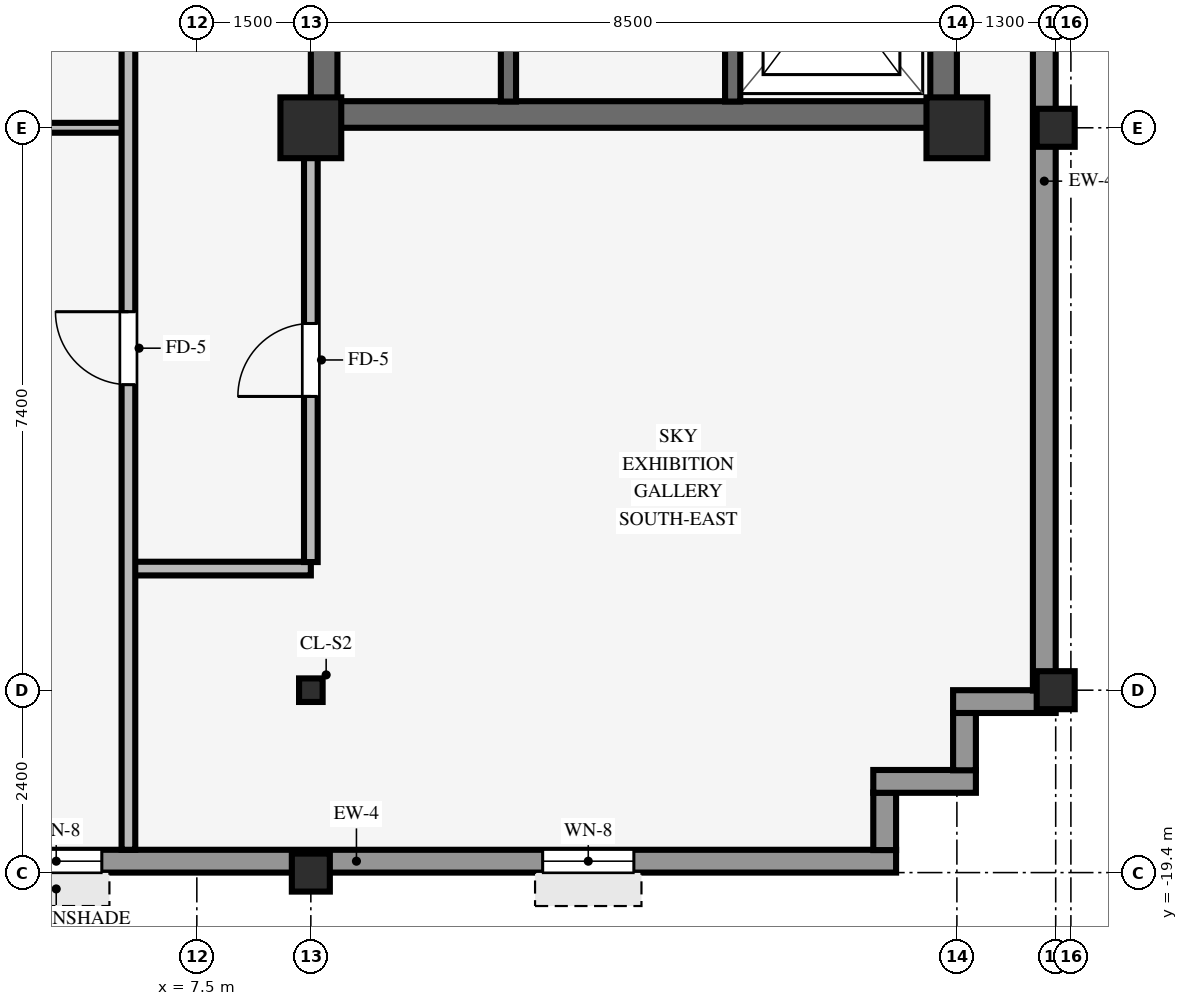
"""IFC4 building model, lengths in metres.
Left out: names, types, materials, properties, quantities, classifications, styles, units other than length and angle.
Written with IfcOpenShell. Run it as: python <this file> out.ifc"""

import sys

from ifc_helpers import new_model, si_unit, direction, frame, frame_2d, origin, origin_2d, place, context, subcontext, project, spatial, rectangle, hollow_rectangle, i_section, extrude, source, transform, mapped, element, fill, save


model = new_model("IFC4")
c1 = context("Model", 3, precision=1e-05, world=origin(), true_north=direction((0.0, 1.0)))
c2 = subcontext(c1, "Body", "Model", "MODEL_VIEW")
j1 = project(units=[si_unit("LENGTHUNIT", "METRE"), si_unit("PLANEANGLEUNIT", "RADIAN")], contexts=[c1])
p1 = place(None, origin())
s1 = spatial("IfcSite", under=j1, at=p1, CompositionType="ELEMENT")
p2 = place(p1, origin())
s2 = spatial("IfcBuilding", under=s1, at=p2, CompositionType="ELEMENT")
p3 = place(p2, frame((0.0, 0.0, 283.5)))
s3 = spatial("IfcBuildingStorey", under=s2, at=p3, CompositionType="ELEMENT", Elevation=283.5)
p4 = place(p3, frame((9.0, -9.425, 0.0), z_axis=(0.0, 0.0, 1.0), x_axis=(1.0, 0.0, 0.0)))
e1 = element("IfcWall", 1, at=p4, inside=s3, PredefinedType="SHEAR", context=c2, shape_type="SweptSolid", body=[
    extrude(rectangle(XDim=8.5, YDim=0.35, at=frame_2d((4.25, 0.0))), origin(), (0.0, 0.0, 1.0), 3.25),
])
p5 = place(p3, frame((9.175, -9.255, 0.0), z_axis=(0.0, 0.0, 1.0), x_axis=(0.0, 1.0, 0.0)))
e2 = element("IfcWall", 2, at=p5, inside=s3, PredefinedType="SHEAR", context=c2, shape_type="SweptSolid", body=[
    extrude(rectangle(XDim=18.51, YDim=0.35, at=frame_2d((9.255, 0.0))), origin(), (0.0, 0.0, 1.0), 3.25),
])
p6 = place(p5, frame((8.655, 0.0, 0.0)))
e3 = element("IfcOpeningElement", 3, at=p6, cuts=e2, PredefinedType="OPENING", context=c2, shape_type="SweptSolid", body=[
    extrude(rectangle(XDim=1.2, YDim=2.15, at=frame_2d((0.6, 1.075))), frame((0.0, 0.185, 0.0), z_axis=(0.0, -1.0, 0.0), x_axis=(1.0, 0.0, 0.0)), (0.0, 0.0, 1.0), 0.37),
])
p7 = place(p3, frame((17.325, -9.255, 0.0), z_axis=(0.0, 0.0, 1.0), x_axis=(0.0, 1.0, 0.0)))
e4 = element("IfcWall", 4, at=p7, inside=s3, PredefinedType="SHEAR", context=c2, shape_type="SweptSolid", body=[
    extrude(rectangle(XDim=18.51, YDim=0.35, at=frame_2d((9.255, 0.0))), origin(), (0.0, 0.0, 1.0), 3.25),
])
for number, where, z_axis, x_axis in (
    (5, (9.0, -9.6, 0.0), (0.0, 0.0, 1.0), (1.0, 0.0, 0.0)),
    (6, (17.5, -9.6, 0.0), (0.0, 0.0, 1.0), (1.0, 0.0, 0.0)),
):
    element("IfcColumn", number, at=place(p3, frame(where, z_axis=z_axis, x_axis=x_axis)), inside=s3, PredefinedType="COLUMN", context=c2, shape_type="SweptSolid", body=[
        extrude(rectangle(XDim=0.8, YDim=0.8, at=origin_2d()), origin(), (0.0, 0.0, 1.0), 3.25),
    ])
for number, where, z_axis, x_axis in (
    (7, (18.8, -17.0, 0.0), (0.0, 0.0, 1.0), (1.0, 0.0, 0.0)),
    (8, (18.8, -9.6, 0.0), (0.0, 0.0, 1.0), (1.0, 0.0, 0.0)),
    (9, (9.0, -19.4, 0.0), (0.0, 0.0, 1.0), (1.0, 0.0, 0.0)),
):
    element("IfcColumn", number, at=place(p3, frame(where, z_axis=z_axis, x_axis=x_axis)), inside=s3, PredefinedType="COLUMN", context=c2, shape_type="SweptSolid", body=[
        extrude(hollow_rectangle(XDim=0.5, YDim=0.5, WallThickness=0.032, InnerFilletRadius=0.032, OuterFilletRadius=0.064, at=origin_2d()), origin(), (0.0, 0.0, 1.0), 3.25),
    ])
p8 = place(p3, frame((9.0, -17.0, 0.0), z_axis=(0.0, 0.0, 1.0), x_axis=(1.0, 0.0, 0.0)))
e10 = element("IfcColumn", 10, at=p8, inside=s3, PredefinedType="COLUMN", context=c2, shape_type="SweptSolid", body=[
    extrude(i_section(OverallWidth=0.31, OverallDepth=0.31, WebThickness=0.015, FlangeThickness=0.015, FilletRadius=0.015, at=origin_2d()), origin(), (0.0, 0.0, 1.0), 3.25),
])
p9 = place(p3, frame((2.5, -19.25, 0.0), z_axis=(0.0, 0.0, 1.0), x_axis=(1.0, 0.0, 0.0)))
e11 = element("IfcWall", 11, at=p9, inside=s3, PredefinedType="STANDARD", context=c2, shape_type="SweptSolid", body=[
    extrude(rectangle(XDim=14.2, YDim=0.3, at=frame_2d((7.1, 0.0))), origin(), (0.0, 0.0, 1.0), 3.24),
])
p10 = place(p9, frame((2.55, 0.0, 0.8)))
e12 = element("IfcOpeningElement", 12, at=p10, cuts=e11, PredefinedType="OPENING", context=c2, shape_type="SweptSolid", body=[
    extrude(rectangle(XDim=1.2, YDim=1.48, at=frame_2d((0.6, 0.74))), frame((0.0, 0.16, 0.0), z_axis=(0.0, -1.0, 0.0), x_axis=(1.0, 0.0, 0.0)), (0.0, 0.0, 1.0), 0.32),
])
p11 = place(p9, frame((9.55, 0.0, 0.8)))
e13 = element("IfcOpeningElement", 13, at=p11, cuts=e11, PredefinedType="OPENING", context=c2, shape_type="SweptSolid", body=[
    extrude(rectangle(XDim=1.2, YDim=1.48, at=frame_2d((0.6, 0.74))), frame((0.0, 0.16, 0.0), z_axis=(0.0, -1.0, 0.0), x_axis=(1.0, 0.0, 0.0)), (0.0, 0.0, 1.0), 0.32),
])
p12 = place(p3, frame((16.55, -19.104, 0.0), z_axis=(0.0, 0.0, 1.0), x_axis=(0.0, 1.0, 0.0)))
e14 = element("IfcWall", 14, at=p12, inside=s3, PredefinedType="STANDARD", context=c2, shape_type="SweptSolid", body=[
    extrude(rectangle(XDim=0.758, YDim=0.3, at=frame_2d((0.379, 0.0))), origin(), (0.0, 0.0, 1.0), 3.24),
])
p13 = place(p3, frame((16.4, -18.2, 0.0), z_axis=(0.0, 0.0, 1.0), x_axis=(1.0, 0.0, 0.0)))
e15 = element("IfcWall", 15, at=p13, inside=s3, PredefinedType="STANDARD", context=c2, shape_type="SweptSolid", body=[
    extrude(rectangle(XDim=1.35, YDim=0.3, at=frame_2d((0.675, 0.0))), origin(), (0.0, 0.0, 1.0), 3.24),
])
p14 = place(p3, frame((17.6, -18.054, 0.0), z_axis=(0.0, 0.0, 1.0), x_axis=(0.0, 1.0, 0.0)))
e16 = element("IfcWall", 16, at=p14, inside=s3, PredefinedType="STANDARD", context=c2, shape_type="SweptSolid", body=[
    extrude(rectangle(XDim=0.758, YDim=0.3, at=frame_2d((0.379, 0.0))), origin(), (0.0, 0.0, 1.0), 3.24),
])
p15 = place(p3, frame((17.45, -17.15, 0.0), z_axis=(0.0, 0.0, 1.0), x_axis=(1.0, 0.0, 0.0)))
e17 = element("IfcWall", 17, at=p15, inside=s3, PredefinedType="STANDARD", context=c2, shape_type="SweptSolid", body=[
    extrude(rectangle(XDim=1.35, YDim=0.3, at=frame_2d((0.675, 0.0))), origin(), (0.0, 0.0, 1.0), 3.24),
])
p16 = place(p3, frame((18.65, -17.004, 0.0), z_axis=(0.0, 0.0, 1.0), x_axis=(0.0, 1.0, 0.0)))
e18 = element("IfcWall", 18, at=p16, inside=s3, PredefinedType="STANDARD", context=c2, shape_type="SweptSolid", body=[
    extrude(rectangle(XDim=13.404, YDim=0.3, at=frame_2d((6.702, 0.0))), origin(), (0.0, 0.0, 1.0), 2.585),
])
p17 = place(p3, frame((14.55, -9.255, 0.0), z_axis=(0.0, 0.0, 1.0), x_axis=(0.0, 1.0, 0.0)))
e19 = element("IfcWall", 19, at=p17, inside=s3, PredefinedType="SHEAR", context=c2, shape_type="SweptSolid", body=[
    extrude(rectangle(XDim=10.16, YDim=0.2, at=frame_2d((5.08, 0.0))), origin(), (0.0, 0.0, 1.0), 3.25),
])
p18 = place(p17, frame((6.615, 0.0, 0.0)))
e20 = element("IfcOpeningElement", 20, at=p18, cuts=e19, PredefinedType="OPENING", context=c2, shape_type="SweptSolid", body=[
    extrude(rectangle(XDim=0.88, YDim=2.1, at=frame_2d((0.44, 1.05))), frame((0.0, 0.11, 0.0), z_axis=(0.0, -1.0, 0.0), x_axis=(1.0, 0.0, 0.0)), (0.0, 0.0, 1.0), 0.22),
])
p19 = place(p17, frame((0.98, 0.0, 0.0)))
e21 = element("IfcOpeningElement", 21, at=p19, cuts=e19, PredefinedType="OPENING", context=c2, shape_type="SweptSolid", body=[
    extrude(rectangle(XDim=1.15, YDim=2.15, at=frame_2d((0.575, 1.075))), frame((0.0, 0.11, 0.0), z_axis=(0.0, -1.0, 0.0), x_axis=(1.0, 0.0, 0.0)), (0.0, 0.0, 1.0), 0.22),
])
p20 = place(p3, frame((11.6, -9.255, 0.0), z_axis=(0.0, 0.0, 1.0), x_axis=(0.0, 1.0, 0.0)))
e22 = element("IfcWall", 22, at=p20, inside=s3, PredefinedType="SHEAR", context=c2, shape_type="SweptSolid", body=[
    extrude(rectangle(XDim=8.025, YDim=0.2, at=frame_2d((4.012, 0.0))), origin(), (0.0, 0.0, 1.0), 3.25),
])
p21 = place(p20, frame((5.615, 0.0, 0.0)))
e23 = element("IfcOpeningElement", 23, at=p21, cuts=e22, PredefinedType="OPENING", context=c2, shape_type="SweptSolid", body=[
    extrude(rectangle(XDim=0.88, YDim=2.1, at=frame_2d((0.44, 1.05))), frame((0.0, 0.11, 0.0), z_axis=(0.0, -1.0, 0.0), x_axis=(1.0, 0.0, 0.0)), (0.0, 0.0, 1.0), 0.22),
])
p22 = place(p3, frame((6.661, -15.4, 0.0), z_axis=(0.0, 0.0, 1.0), x_axis=(1.0, 0.0, 0.0)))
e24 = element("IfcWall", 24, at=p22, inside=s3, PredefinedType="PARTITIONING", context=c2, shape_type="SweptSolid", body=[
    extrude(rectangle(XDim=2.339, YDim=0.18, at=frame_2d((1.169, 0.0))), origin(), (0.0, 0.0, 1.0), 3.24),
])
p23 = place(p3, frame((0.151, -9.6, 0.0), z_axis=(0.0, 0.0, 1.0), x_axis=(1.0, 0.0, 0.0)))
e25 = element("IfcWall", 25, at=p23, inside=s3, PredefinedType="PARTITIONING", context=c2, shape_type="SweptSolid", body=[
    extrude(rectangle(XDim=6.388, YDim=0.13, at=frame_2d((3.194, 0.0))), origin(), (0.0, 0.0, 1.0), 2.285),
])
p24 = place(p3, frame((6.6, -19.1, 0.0), z_axis=(0.0, 0.0, 1.0), x_axis=(0.0, 1.0, 0.0)))
e26 = element("IfcWall", 26, at=p24, inside=s3, PredefinedType="PARTITIONING", context=c2, shape_type="SweptSolid", body=[
    extrude(rectangle(XDim=17.764, YDim=0.18, at=frame_2d((8.882, 0.0))), origin(), (0.0, 0.0, 1.0), 3.24),
])
p25 = place(p24, frame((6.12, 0.0, 0.0)))
e27 = element("IfcOpeningElement", 27, at=p25, cuts=e26, PredefinedType="OPENING", context=c2, shape_type="SweptSolid", body=[
    extrude(rectangle(XDim=0.96, YDim=2.1, at=frame_2d((0.48, 1.05))), frame((0.0, 0.1, 0.0), z_axis=(0.0, -1.0, 0.0), x_axis=(1.0, 0.0, 0.0)), (0.0, 0.0, 1.0), 0.2),
])
p26 = place(p3, frame((9.0, -15.314, 0.0), z_axis=(0.0, 0.0, 1.0), x_axis=(0.0, 1.0, 0.0)))
e28 = element("IfcWall", 28, at=p26, inside=s3, PredefinedType="PARTITIONING", context=c2, shape_type="SweptSolid", body=[
    extrude(rectangle(XDim=5.318, YDim=0.18, at=frame_2d((2.659, 0.0))), origin(), (0.0, 0.0, 1.0), 2.772),
])
p27 = place(p26, frame((2.179, 0.0, 0.0)))
e29 = element("IfcOpeningElement", 29, at=p27, cuts=e28, PredefinedType="OPENING", context=c2, shape_type="SweptSolid", body=[
    extrude(rectangle(XDim=0.96, YDim=2.1, at=frame_2d((0.48, 1.05))), frame((0.0, 0.1, 0.0), z_axis=(0.0, -1.0, 0.0), x_axis=(1.0, 0.0, 0.0)), (0.0, 0.0, 1.0), 0.2),
])
m1 = source(origin(), c2, "Body", "SweptSolid", [
    extrude(rectangle(XDim=1.2, YDim=1.48, at=frame_2d((0.6, 0.74))), frame((0.0, 0.03, 0.0), z_axis=(0.0, -1.0, 0.0), x_axis=(1.0, 0.0, 0.0)), (0.0, 0.0, 1.0), 0.06),
])
p28 = place(p10, origin())
e30 = element("IfcWindow", 30, at=p28, inside=s3, PartitioningType="SINGLE_PANEL", PredefinedType="WINDOW", context=c2, shape_type="MappedRepresentation", body=[
    mapped(m1, transform((0.0, 0.0, 0.0), scale=1.0)),
])
fill(e12, e30)
p29 = place(p11, origin())
e31 = element("IfcWindow", 31, at=p29, inside=s3, PartitioningType="SINGLE_PANEL", PredefinedType="WINDOW", context=c2, shape_type="MappedRepresentation", body=[
    mapped(m1, transform((0.0, 0.0, 0.0), scale=1.0)),
])
fill(e13, e31)
m2 = source(origin(), c2, "Body", "SweptSolid", [
    extrude(rectangle(XDim=0.96, YDim=2.1, at=frame_2d((0.48, 1.05))), frame((0.0, 0.025, 0.0), z_axis=(0.0, -1.0, 0.0), x_axis=(1.0, 0.0, 0.0)), (0.0, 0.0, 1.0), 0.05),
])
p30 = place(p25, origin())
e32 = element("IfcDoor", 32, at=p30, inside=s3, OperationType="SINGLE_SWING_RIGHT", PredefinedType="DOOR", context=c2, shape_type="MappedRepresentation", body=[
    mapped(m2, transform((0.0, 0.0, 0.0), scale=1.0)),
])
fill(e27, e32)
p31 = place(p27, origin())
e33 = element("IfcDoor", 33, at=p31, inside=s3, OperationType="SINGLE_SWING_LEFT", PredefinedType="DOOR", context=c2, shape_type="MappedRepresentation", body=[
    mapped(m2, transform((0.0, 0.0, 0.0), scale=1.0)),
])
fill(e29, e33)
save(model, sys.argv[1])
